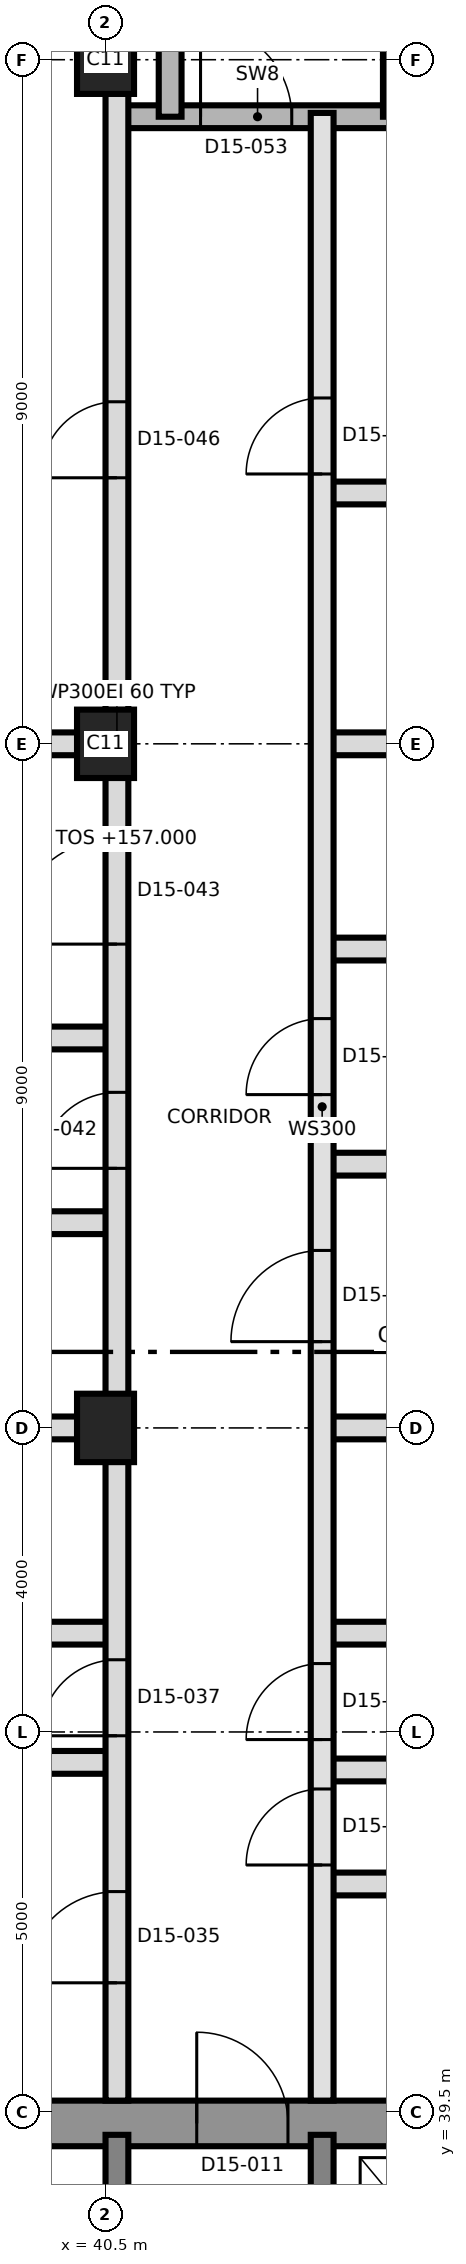
"""IFC4 building model, lengths in metres.
Left out: names, types, materials, properties, quantities, classifications, styles, units other than length and angle.
Written with IfcOpenShell. Run it as: python <this file> out.ifc"""

import sys

from ifc_helpers import new_model, si_unit, direction, frame, frame_2d, origin, origin_2d, place, context, subcontext, project, spatial, rectangle, extrude, element, fill, save


model = new_model("IFC4")
c1 = context("Model", 3, precision=1e-05, world=origin(), true_north=direction((0.0, 1.0)))
c2 = subcontext(c1, "Body", "Model", "MODEL_VIEW")
j1 = project(units=[si_unit("LENGTHUNIT", "METRE"), si_unit("PLANEANGLEUNIT", "RADIAN")], contexts=[c1])
p1 = place(None, origin())
s1 = spatial("IfcSite", under=j1, at=p1, CompositionType="ELEMENT")
p2 = place(p1, origin())
s2 = spatial("IfcBuilding", under=s1, at=p2, CompositionType="ELEMENT")
p3 = place(p2, frame((0.0, 0.0, 157.0)))
s3 = spatial("IfcBuildingStorey", under=s2, at=p3, CompositionType="ELEMENT", Elevation=157.0)
p4 = place(p3, frame((31.2, 39.35, 0.0), z_axis=(0.0, 0.0, 1.0), x_axis=(1.0, 0.0, 0.0)))
e1 = element("IfcWall", 1, at=p4, inside=s3, PredefinedType="SHEAR", context=c2, shape_type="SweptSolid", body=[
    extrude(rectangle(XDim=27.0, YDim=0.6, at=frame_2d((13.5, 0.0))), origin(), (0.0, 0.0, 1.0), 3.7),
])
p5 = place(p4, frame((10.5, 0.0, 0.0)))
e2 = element("IfcOpeningElement", 2, at=p5, cuts=e1, PredefinedType="OPENING", context=c2, shape_type="SweptSolid", body=[
    extrude(rectangle(XDim=1.2, YDim=2.1, at=frame_2d((0.6, 1.05))), frame((0.0, 0.31, 0.0), z_axis=(0.0, -1.0, 0.0), x_axis=(1.0, 0.0, 0.0)), (0.0, 0.0, 1.0), 0.62),
])
for number, where, z_axis, x_axis in (
    (3, (40.65, 33.5, 0.0), (0.0, 0.0, 1.0), (0.0, 1.0, 0.0)),
    (4, (43.35, 33.5, 0.0), (0.0, 0.0, 1.0), (0.0, 1.0, 0.0)),
):
    element("IfcWall", number, at=place(p3, frame(where, z_axis=z_axis, x_axis=x_axis)), inside=s3, PredefinedType="SHEAR", context=c2, shape_type="SweptSolid", body=[
        extrude(rectangle(XDim=5.7, YDim=0.3, at=frame_2d((2.85, 0.0))), origin(), (0.0, 0.0, 1.0), 3.7),
    ])
for number, where, z_axis, x_axis in (
    (5, (40.5, 48.5, 0.0), (0.0, 0.0, 1.0), (0.0, 1.0, 0.0)),
    (6, (40.5, 57.5, 0.0), (0.0, 0.0, 1.0), (0.0, 1.0, 0.0)),
    (7, (40.5, 66.5, 0.0), (0.0, 0.0, 1.0), (0.0, 1.0, 0.0)),
):
    element("IfcColumn", number, at=place(p3, frame(where, z_axis=z_axis, x_axis=x_axis)), inside=s3, PredefinedType="COLUMN", context=c2, shape_type="SweptSolid", body=[
        extrude(rectangle(XDim=0.9, YDim=0.75, at=origin_2d()), origin(), (0.0, 0.0, 1.0), 3.7),
    ])
p6 = place(p3, frame((43.35, 42.5, 0.0), z_axis=(0.0, 0.0, 1.0), x_axis=(1.0, 0.0, 0.0)))
e8 = element("IfcWall", 8, at=p6, inside=s3, PredefinedType="PARTITIONING", context=c2, shape_type="SweptSolid", body=[
    extrude(rectangle(XDim=3.3, YDim=0.3, at=frame_2d((1.65, 0.0))), origin(), (0.0, 0.0, 1.0), 3.4),
])
p7 = place(p3, frame((43.35, 44.0, 0.0), z_axis=(0.0, 0.0, 1.0), x_axis=(1.0, 0.0, 0.0)))
e9 = element("IfcWall", 9, at=p7, inside=s3, PredefinedType="PARTITIONING", context=c2, shape_type="SweptSolid", body=[
    extrude(rectangle(XDim=6.701, YDim=0.3, at=frame_2d((3.351, 0.0))), origin(), (0.0, 0.0, 1.0), 3.4),
])
p8 = place(p3, frame((31.425, 44.1, 0.0), z_axis=(0.0, 0.0, 1.0), x_axis=(1.0, 0.0, 0.0)))
e10 = element("IfcWall", 10, at=p8, inside=s3, PredefinedType="PARTITIONING", context=c2, shape_type="SweptSolid", body=[
    extrude(rectangle(XDim=9.225, YDim=0.3, at=frame_2d((4.612, 0.0))), origin(), (0.0, 0.0, 1.0), 3.4),
])
for number, where, z_axis, x_axis in (
    (11, (37.45, 45.8, 0.0), (0.0, 0.0, 1.0), (1.0, 0.0, 0.0)),
    (12, (43.35, 45.8, 0.0), (0.0, 0.0, 1.0), (1.0, 0.0, 0.0)),
):
    element("IfcWall", number, at=place(p3, frame(where, z_axis=z_axis, x_axis=x_axis)), inside=s3, PredefinedType="PARTITIONING", context=c2, shape_type="SweptSolid", body=[
        extrude(rectangle(XDim=3.2, YDim=0.3, at=frame_2d((1.6, 0.0))), origin(), (0.0, 0.0, 1.0), 3.4),
    ])
p9 = place(p3, frame((31.425, 48.5, 0.0), z_axis=(0.0, 0.0, 1.0), x_axis=(1.0, 0.0, 0.0)))
e13 = element("IfcWall", 13, at=p9, inside=s3, PredefinedType="PARTITIONING", context=c2, shape_type="SweptSolid", body=[
    extrude(rectangle(XDim=9.225, YDim=0.3, at=frame_2d((4.612, 0.0))), origin(), (0.0, 0.0, 1.0), 3.4),
])
p10 = place(p3, frame((43.35, 48.5, 0.0), z_axis=(0.0, 0.0, 1.0), x_axis=(1.0, 0.0, 0.0)))
e14 = element("IfcWall", 14, at=p10, inside=s3, PredefinedType="PARTITIONING", context=c2, shape_type="SweptSolid", body=[
    extrude(rectangle(XDim=6.225, YDim=0.3, at=frame_2d((3.112, 0.0))), origin(), (0.0, 0.0, 1.0), 3.4),
])
p11 = place(p3, frame((37.45, 51.2, 0.0), z_axis=(0.0, 0.0, 1.0), x_axis=(1.0, 0.0, 0.0)))
e15 = element("IfcWall", 15, at=p11, inside=s3, PredefinedType="PARTITIONING", context=c2, shape_type="SweptSolid", body=[
    extrude(rectangle(XDim=3.2, YDim=0.3, at=frame_2d((1.6, 0.0))), origin(), (0.0, 0.0, 1.0), 3.4),
])
p12 = place(p3, frame((43.35, 51.97, 0.0), z_axis=(0.0, 0.0, 1.0), x_axis=(1.0, 0.0, 0.0)))
e16 = element("IfcWall", 16, at=p12, inside=s3, PredefinedType="PARTITIONING", context=c2, shape_type="SweptSolid", body=[
    extrude(rectangle(XDim=6.405, YDim=0.3, at=frame_2d((3.202, 0.0))), origin(), (0.0, 0.0, 1.0), 3.4),
])
p13 = place(p3, frame((31.425, 53.63, 0.0), z_axis=(0.0, 0.0, 1.0), x_axis=(1.0, 0.0, 0.0)))
e17 = element("IfcWall", 17, at=p13, inside=s3, PredefinedType="PARTITIONING", context=c2, shape_type="SweptSolid", body=[
    extrude(rectangle(XDim=9.225, YDim=0.3, at=frame_2d((4.612, 0.0))), origin(), (0.0, 0.0, 1.0), 3.4),
])
p14 = place(p3, frame((43.35, 54.8, 0.0), z_axis=(0.0, 0.0, 1.0), x_axis=(1.0, 0.0, 0.0)))
e18 = element("IfcWall", 18, at=p14, inside=s3, PredefinedType="PARTITIONING", context=c2, shape_type="SweptSolid", body=[
    extrude(rectangle(XDim=3.2, YDim=0.3, at=frame_2d((1.6, 0.0))), origin(), (0.0, 0.0, 1.0), 3.4),
])
p15 = place(p3, frame((31.425, 57.5, 0.0), z_axis=(0.0, 0.0, 1.0), x_axis=(1.0, 0.0, 0.0)))
e19 = element("IfcWall", 19, at=p15, inside=s3, PredefinedType="PARTITIONING", context=c2, shape_type="SweptSolid", body=[
    extrude(rectangle(XDim=9.225, YDim=0.3, at=frame_2d((4.612, 0.0))), origin(), (0.0, 0.0, 1.0), 3.4),
])
p16 = place(p3, frame((43.35, 57.5, 0.0), z_axis=(0.0, 0.0, 1.0), x_axis=(1.0, 0.0, 0.0)))
e20 = element("IfcWall", 20, at=p16, inside=s3, PredefinedType="PARTITIONING", context=c2, shape_type="SweptSolid", body=[
    extrude(rectangle(XDim=6.225, YDim=0.3, at=frame_2d((3.112, 0.0))), origin(), (0.0, 0.0, 1.0), 3.4),
])
p17 = place(p3, frame((43.35, 60.8, 0.0), z_axis=(0.0, 0.0, 1.0), x_axis=(1.0, 0.0, 0.0)))
e21 = element("IfcWall", 21, at=p17, inside=s3, PredefinedType="PARTITIONING", context=c2, shape_type="SweptSolid", body=[
    extrude(rectangle(XDim=3.5, YDim=0.3, at=frame_2d((1.75, 0.0))), origin(), (0.0, 0.0, 1.0), 3.4),
])
p18 = place(p3, frame((40.65, 65.75, 0.0), z_axis=(0.0, 0.0, 1.0), x_axis=(1.0, 0.0, 0.0)))
e22 = element("IfcWall", 22, at=p18, inside=s3, PredefinedType="SHEAR", context=c2, shape_type="SweptSolid", body=[
    extrude(rectangle(XDim=3.7, YDim=0.3, at=frame_2d((1.85, 0.0))), origin(), (0.0, 0.0, 1.0), 3.4),
])
p19 = place(p18, frame((1.1, 0.0, 0.0)))
e23 = element("IfcOpeningElement", 23, at=p19, cuts=e22, PredefinedType="OPENING", context=c2, shape_type="SweptSolid", body=[
    extrude(rectangle(XDim=1.2, YDim=2.1, at=frame_2d((0.6, 1.05))), frame((0.0, 0.16, 0.0), z_axis=(0.0, -1.0, 0.0), x_axis=(1.0, 0.0, 0.0)), (0.0, 0.0, 1.0), 0.32),
])
p20 = place(p3, frame((40.65, 39.65, 0.0), z_axis=(0.0, 0.0, 1.0), x_axis=(0.0, 1.0, 0.0)))
e24 = element("IfcWall", 24, at=p20, inside=s3, PredefinedType="PARTITIONING", context=c2, shape_type="SweptSolid", body=[
    extrude(rectangle(XDim=35.925, YDim=0.3, at=frame_2d((17.962, 0.0))), origin(), (0.0, 0.0, 1.0), 3.4),
])
p21 = place(p20, frame((1.55, 0.0, 0.0)))
e25 = element("IfcOpeningElement", 25, at=p21, cuts=e24, PredefinedType="OPENING", context=c2, shape_type="SweptSolid", body=[
    extrude(rectangle(XDim=1.2, YDim=2.1, at=frame_2d((0.6, 1.05))), frame((0.0, 0.16, 0.0), z_axis=(0.0, -1.0, 0.0), x_axis=(1.0, 0.0, 0.0)), (0.0, 0.0, 1.0), 0.32),
])
p22 = place(p20, frame((4.8, 0.0, 0.0)))
e26 = element("IfcOpeningElement", 26, at=p22, cuts=e24, PredefinedType="OPENING", context=c2, shape_type="SweptSolid", body=[
    extrude(rectangle(XDim=1.0, YDim=2.1, at=frame_2d((0.5, 1.05))), frame((0.0, 0.16, 0.0), z_axis=(0.0, -1.0, 0.0), x_axis=(1.0, 0.0, 0.0)), (0.0, 0.0, 1.0), 0.32),
])
p23 = place(p20, frame((12.265, 0.0, 0.0)))
e27 = element("IfcOpeningElement", 27, at=p23, cuts=e24, PredefinedType="OPENING", context=c2, shape_type="SweptSolid", body=[
    extrude(rectangle(XDim=1.0, YDim=2.1, at=frame_2d((0.5, 1.05))), frame((0.0, 0.16, 0.0), z_axis=(0.0, -1.0, 0.0), x_axis=(1.0, 0.0, 0.0)), (0.0, 0.0, 1.0), 0.32),
])
p24 = place(p20, frame((15.215, 0.0, 0.0)))
e28 = element("IfcOpeningElement", 28, at=p24, cuts=e24, PredefinedType="OPENING", context=c2, shape_type="SweptSolid", body=[
    extrude(rectangle(XDim=1.4, YDim=2.1, at=frame_2d((0.7, 1.05))), frame((0.0, 0.16, 0.0), z_axis=(0.0, -1.0, 0.0), x_axis=(1.0, 0.0, 0.0)), (0.0, 0.0, 1.0), 0.32),
])
p25 = place(p20, frame((21.35, 0.0, 0.0)))
e29 = element("IfcOpeningElement", 29, at=p25, cuts=e24, PredefinedType="OPENING", context=c2, shape_type="SweptSolid", body=[
    extrude(rectangle(XDim=1.0, YDim=2.4, at=frame_2d((0.5, 1.2))), frame((0.0, 0.16, 0.0), z_axis=(0.0, -1.0, 0.0), x_axis=(1.0, 0.0, 0.0)), (0.0, 0.0, 1.0), 0.32),
])
p26 = place(p3, frame((41.35, 65.75, 0.0), z_axis=(0.0, 0.0, 1.0), x_axis=(0.0, 1.0, 0.0)))
e30 = element("IfcWall", 30, at=p26, inside=s3, PredefinedType="SHEAR", context=c2, shape_type="SweptSolid", body=[
    extrude(rectangle(XDim=8.85, YDim=0.3, at=frame_2d((4.425, 0.0))), origin(), (0.0, 0.0, 1.0), 3.4),
])
p27 = place(p3, frame((43.35, 39.65, 0.0), z_axis=(0.0, 0.0, 1.0), x_axis=(0.0, 1.0, 0.0)))
e31 = element("IfcWall", 31, at=p27, inside=s3, PredefinedType="SOLIDWALL", context=c2, shape_type="SweptSolid", body=[
    extrude(rectangle(XDim=26.15, YDim=0.3, at=frame_2d((13.075, 0.0))), origin(), (0.0, 0.0, 1.0), 3.4),
])
p28 = place(p27, frame((3.1, 0.0, 0.0)))
e32 = element("IfcOpeningElement", 32, at=p28, cuts=e31, PredefinedType="OPENING", context=c2, shape_type="SweptSolid", body=[
    extrude(rectangle(XDim=1.0, YDim=2.1, at=frame_2d((0.5, 1.05))), frame((0.0, 0.16, 0.0), z_axis=(0.0, -1.0, 0.0), x_axis=(1.0, 0.0, 0.0)), (0.0, 0.0, 1.0), 0.32),
])
p29 = place(p27, frame((4.75, 0.0, 0.0)))
e33 = element("IfcOpeningElement", 33, at=p29, cuts=e31, PredefinedType="OPENING", context=c2, shape_type="SweptSolid", body=[
    extrude(rectangle(XDim=1.0, YDim=2.1, at=frame_2d((0.5, 1.05))), frame((0.0, 0.16, 0.0), z_axis=(0.0, -1.0, 0.0), x_axis=(1.0, 0.0, 0.0)), (0.0, 0.0, 1.0), 0.32),
])
p30 = place(p27, frame((9.985, 0.0, 0.0)))
e34 = element("IfcOpeningElement", 34, at=p30, cuts=e31, PredefinedType="OPENING", context=c2, shape_type="SweptSolid", body=[
    extrude(rectangle(XDim=1.2, YDim=2.1, at=frame_2d((0.6, 1.05))), frame((0.0, 0.16, 0.0), z_axis=(0.0, -1.0, 0.0), x_axis=(1.0, 0.0, 0.0)), (0.0, 0.0, 1.0), 0.32),
])
p31 = place(p27, frame((13.235, 0.0, 0.0)))
e35 = element("IfcOpeningElement", 35, at=p31, cuts=e31, PredefinedType="OPENING", context=c2, shape_type="SweptSolid", body=[
    extrude(rectangle(XDim=1.0, YDim=2.1, at=frame_2d((0.5, 1.05))), frame((0.0, 0.16, 0.0), z_axis=(0.0, -1.0, 0.0), x_axis=(1.0, 0.0, 0.0)), (0.0, 0.0, 1.0), 0.32),
])
p32 = place(p27, frame((21.4, 0.0, 0.0)))
e36 = element("IfcOpeningElement", 36, at=p32, cuts=e31, PredefinedType="OPENING", context=c2, shape_type="SweptSolid", body=[
    extrude(rectangle(XDim=1.0, YDim=2.4, at=frame_2d((0.5, 1.2))), frame((0.0, 0.16, 0.0), z_axis=(0.0, -1.0, 0.0), x_axis=(1.0, 0.0, 0.0)), (0.0, 0.0, 1.0), 0.32),
])
p33 = place(p3, frame((44.3, 65.75, 0.0), z_axis=(0.0, 0.0, 1.0), x_axis=(0.0, 1.0, 0.0)))
e37 = element("IfcWall", 37, at=p33, inside=s3, PredefinedType="SHEAR", context=c2, shape_type="SweptSolid", body=[
    extrude(rectangle(XDim=8.85, YDim=0.3, at=frame_2d((4.425, 0.0))), origin(), (0.0, 0.0, 1.0), 3.4),
])
p34 = place(p5, origin())
e38 = element("IfcDoor", 38, at=p34, inside=s3, OperationType="SINGLE_SWING_RIGHT", PredefinedType="DOOR", context=c2, shape_type="SweptSolid", body=[
    extrude(rectangle(XDim=1.2, YDim=2.1, at=frame_2d((0.6, 1.05))), frame((0.0, 0.025, 0.0), z_axis=(0.0, -1.0, 0.0), x_axis=(1.0, 0.0, 0.0)), (0.0, 0.0, 1.0), 0.05),
])
fill(e2, e38)
p35 = place(p28, origin())
e39 = element("IfcDoor", 39, at=p35, inside=s3, OperationType="SINGLE_SWING_RIGHT", PredefinedType="DOOR", context=c2, shape_type="SweptSolid", body=[
    extrude(rectangle(XDim=1.0, YDim=2.1, at=frame_2d((0.5, 1.05))), frame((0.0, 0.025, 0.0), z_axis=(0.0, -1.0, 0.0), x_axis=(1.0, 0.0, 0.0)), (0.0, 0.0, 1.0), 0.05),
])
fill(e32, e39)
p36 = place(p29, origin())
e40 = element("IfcDoor", 40, at=p36, inside=s3, OperationType="SINGLE_SWING_LEFT", PredefinedType="DOOR", context=c2, shape_type="SweptSolid", body=[
    extrude(rectangle(XDim=1.0, YDim=2.1, at=frame_2d((0.5, 1.05))), frame((0.0, 0.025, 0.0), z_axis=(0.0, -1.0, 0.0), x_axis=(1.0, 0.0, 0.0)), (0.0, 0.0, 1.0), 0.05),
])
fill(e33, e40)
p37 = place(p21, origin())
e41 = element("IfcDoor", 41, at=p37, inside=s3, OperationType="SINGLE_SWING_LEFT", PredefinedType="DOOR", context=c2, shape_type="SweptSolid", body=[
    extrude(rectangle(XDim=1.2, YDim=2.1, at=frame_2d((0.6, 1.05))), frame((0.0, 0.025, 0.0), z_axis=(0.0, -1.0, 0.0), x_axis=(1.0, 0.0, 0.0)), (0.0, 0.0, 1.0), 0.05),
])
fill(e25, e41)
p38 = place(p22, origin())
e42 = element("IfcDoor", 42, at=p38, inside=s3, OperationType="SINGLE_SWING_LEFT", PredefinedType="DOOR", context=c2, shape_type="SweptSolid", body=[
    extrude(rectangle(XDim=1.0, YDim=2.1, at=frame_2d((0.5, 1.05))), frame((0.0, 0.025, 0.0), z_axis=(0.0, -1.0, 0.0), x_axis=(1.0, 0.0, 0.0)), (0.0, 0.0, 1.0), 0.05),
])
fill(e26, e42)
p39 = place(p30, origin())
e43 = element("IfcDoor", 43, at=p39, inside=s3, OperationType="SINGLE_SWING_LEFT", PredefinedType="DOOR", context=c2, shape_type="SweptSolid", body=[
    extrude(rectangle(XDim=1.2, YDim=2.1, at=frame_2d((0.6, 1.05))), frame((0.0, 0.025, 0.0), z_axis=(0.0, -1.0, 0.0), x_axis=(1.0, 0.0, 0.0)), (0.0, 0.0, 1.0), 0.05),
])
fill(e34, e43)
p40 = place(p31, origin())
e44 = element("IfcDoor", 44, at=p40, inside=s3, OperationType="SINGLE_SWING_LEFT", PredefinedType="DOOR", context=c2, shape_type="SweptSolid", body=[
    extrude(rectangle(XDim=1.0, YDim=2.1, at=frame_2d((0.5, 1.05))), frame((0.0, 0.025, 0.0), z_axis=(0.0, -1.0, 0.0), x_axis=(1.0, 0.0, 0.0)), (0.0, 0.0, 1.0), 0.05),
])
fill(e35, e44)
p41 = place(p23, origin())
e45 = element("IfcDoor", 45, at=p41, inside=s3, OperationType="SINGLE_SWING_LEFT", PredefinedType="DOOR", context=c2, shape_type="SweptSolid", body=[
    extrude(rectangle(XDim=1.0, YDim=2.1, at=frame_2d((0.5, 1.05))), frame((0.0, 0.025, 0.0), z_axis=(0.0, -1.0, 0.0), x_axis=(1.0, 0.0, 0.0)), (0.0, 0.0, 1.0), 0.05),
])
fill(e27, e45)
p42 = place(p24, origin())
e46 = element("IfcDoor", 46, at=p42, inside=s3, OperationType="SINGLE_SWING_RIGHT", PredefinedType="DOOR", context=c2, shape_type="SweptSolid", body=[
    extrude(rectangle(XDim=1.4, YDim=2.1, at=frame_2d((0.7, 1.05))), frame((0.0, 0.025, 0.0), z_axis=(0.0, -1.0, 0.0), x_axis=(1.0, 0.0, 0.0)), (0.0, 0.0, 1.0), 0.05),
])
fill(e28, e46)
p43 = place(p32, origin())
e47 = element("IfcDoor", 47, at=p43, inside=s3, OperationType="SINGLE_SWING_LEFT", PredefinedType="DOOR", context=c2, shape_type="SweptSolid", body=[
    extrude(rectangle(XDim=1.0, YDim=2.4, at=frame_2d((0.5, 1.2))), frame((0.0, 0.025, 0.0), z_axis=(0.0, -1.0, 0.0), x_axis=(1.0, 0.0, 0.0)), (0.0, 0.0, 1.0), 0.05),
])
fill(e36, e47)
p44 = place(p25, origin())
e48 = element("IfcDoor", 48, at=p44, inside=s3, OperationType="SINGLE_SWING_RIGHT", PredefinedType="DOOR", context=c2, shape_type="SweptSolid", body=[
    extrude(rectangle(XDim=1.0, YDim=2.4, at=frame_2d((0.5, 1.2))), frame((0.0, 0.025, 0.0), z_axis=(0.0, -1.0, 0.0), x_axis=(1.0, 0.0, 0.0)), (0.0, 0.0, 1.0), 0.05),
])
fill(e29, e48)
p45 = place(p19, origin())
e49 = element("IfcDoor", 49, at=p45, inside=s3, OperationType="SINGLE_SWING_RIGHT", PredefinedType="DOOR", context=c2, shape_type="SweptSolid", body=[
    extrude(rectangle(XDim=1.2, YDim=2.1, at=frame_2d((0.6, 1.05))), frame((0.0, 0.025, 0.0), z_axis=(0.0, -1.0, 0.0), x_axis=(1.0, 0.0, 0.0)), (0.0, 0.0, 1.0), 0.05),
])
fill(e23, e49)
save(model, sys.argv[1])
